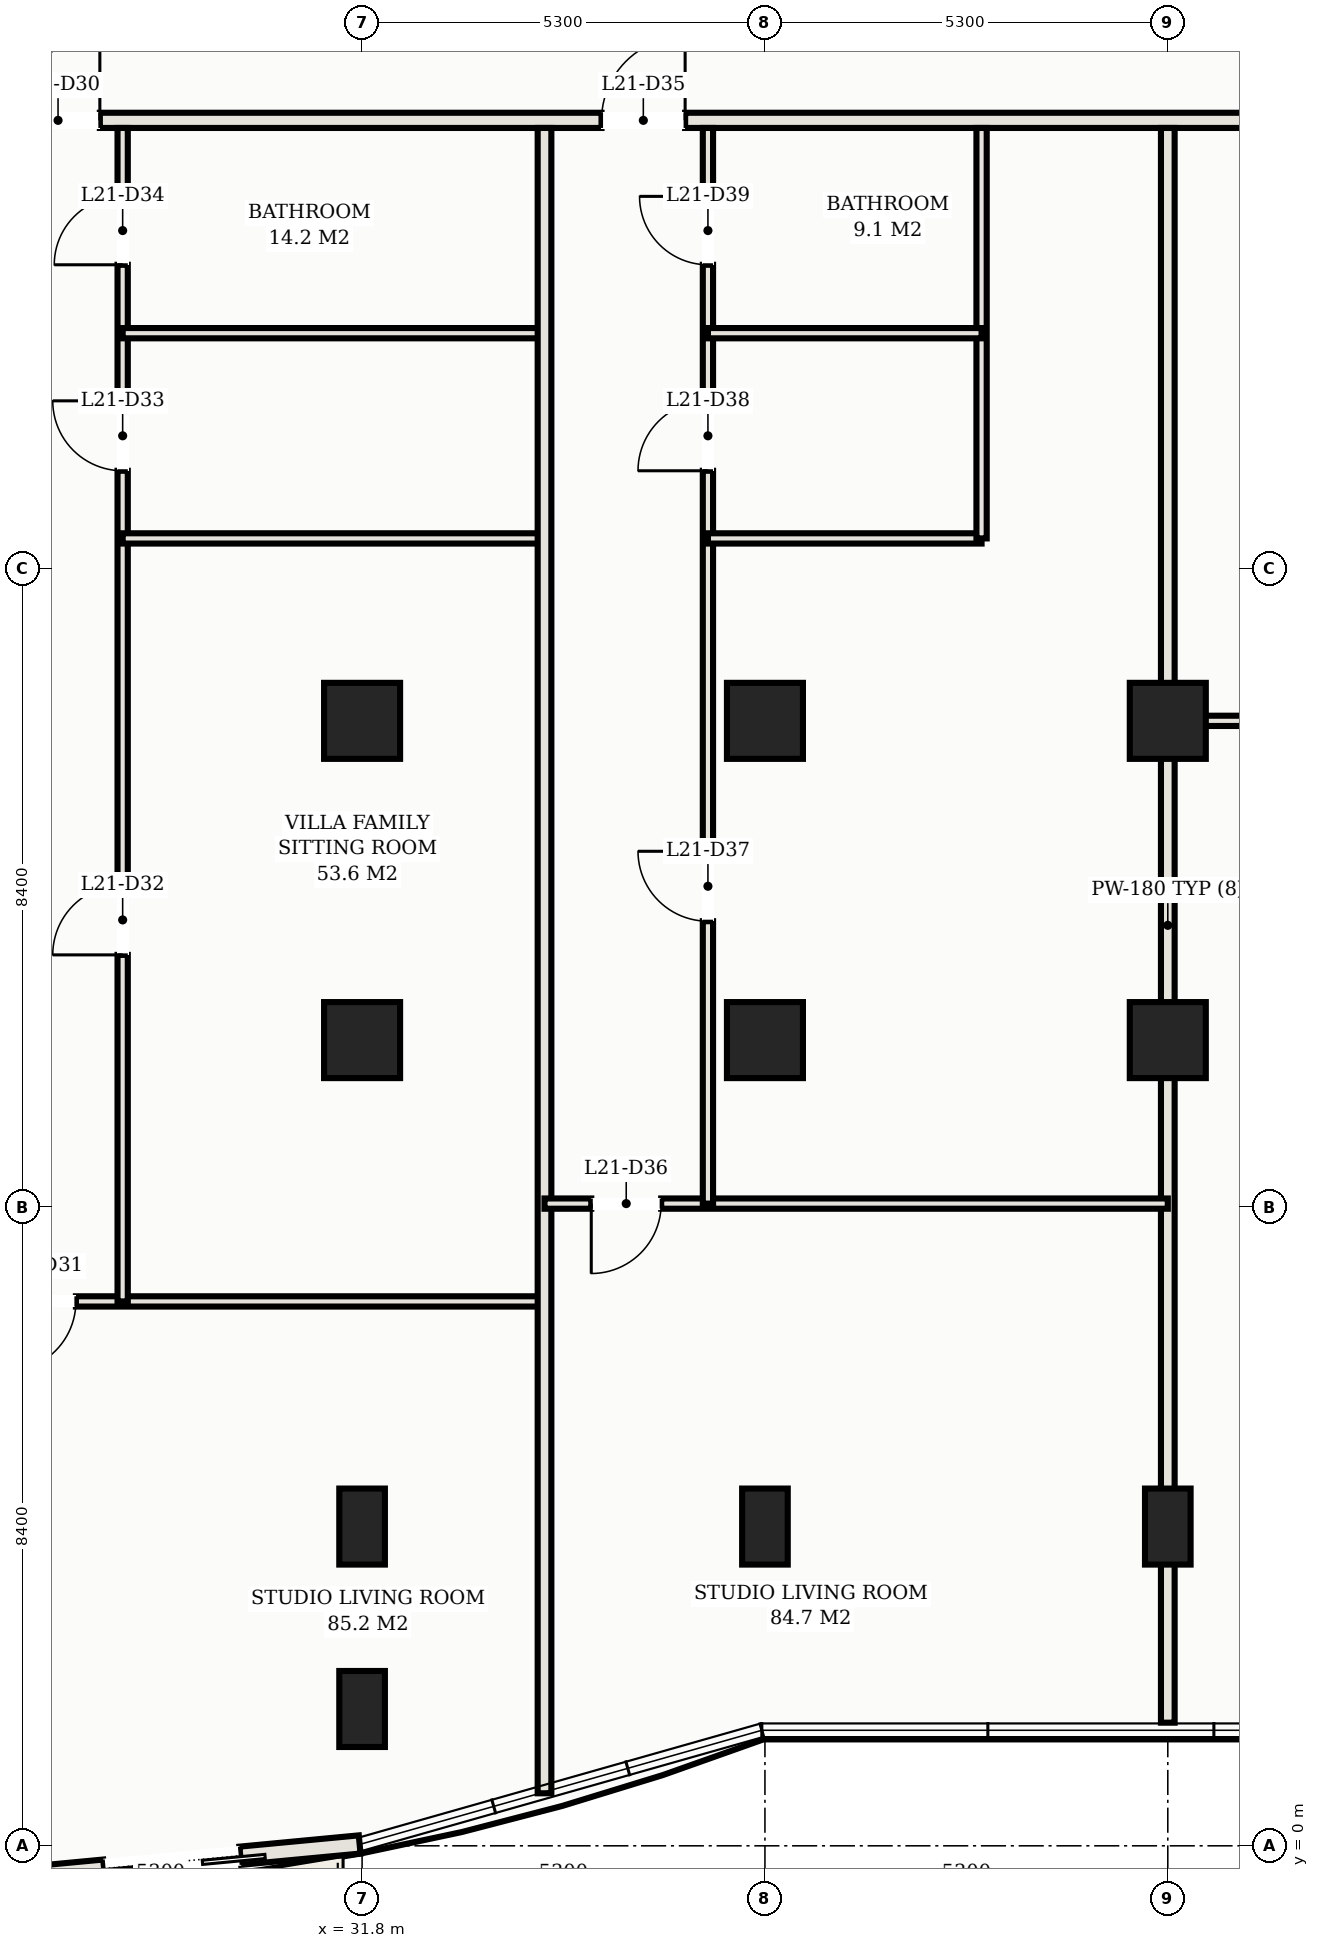
"""IFC4 building model, lengths in metres.
Left out: names, types, materials, properties, quantities, classifications, styles, units other than length and angle.
Written with IfcOpenShell. Run it as: python <this file> out.ifc"""

import sys

from ifc_helpers import new_model, si_unit, direction, frame, frame_2d, origin, origin_2d, place, context, subcontext, project, spatial, rectangle, hollow_rectangle, extrude, element, fill, save


model = new_model("IFC4")
c1 = context("Model", 3, precision=1e-05, world=origin(), true_north=direction((0.0, 1.0)))
c2 = subcontext(c1, "Body", "Model", "MODEL_VIEW")
j1 = project(units=[si_unit("LENGTHUNIT", "METRE"), si_unit("PLANEANGLEUNIT", "RADIAN")], contexts=[c1])
p1 = place(None, origin())
s1 = spatial("IfcSite", under=j1, at=p1, CompositionType="ELEMENT")
p2 = place(p1, origin())
s2 = spatial("IfcBuilding", under=s1, at=p2, CompositionType="ELEMENT")
p3 = place(p2, frame((0.0, 0.0, 81.7)))
s3 = spatial("IfcBuildingStorey", under=s2, at=p3, CompositionType="ELEMENT", Elevation=81.7)
for number, where, z_axis, x_axis in (
    (1, (31.8, 14.8, 0.0), (0.0, 0.0, 1.0), (1.0, 0.0, 0.0)),
    (2, (31.8, 10.6, 0.0), (0.0, 0.0, 1.0), (1.0, 0.0, 0.0)),
    (3, (37.1, 14.8, 0.0), (0.0, 0.0, 1.0), (1.0, 0.0, 0.0)),
    (4, (37.1, 10.6, 0.0), (0.0, 0.0, 1.0), (1.0, 0.0, 0.0)),
    (5, (42.4, 14.8, 0.0), (0.0, 0.0, 1.0), (1.0, 0.0, 0.0)),
    (6, (42.4, 10.6, 0.0), (0.0, 0.0, 1.0), (1.0, 0.0, 0.0)),
):
    element("IfcColumn", number, at=place(p3, frame(where, z_axis=z_axis, x_axis=x_axis)), inside=s3, PredefinedType="COLUMN", context=c2, shape_type="SweptSolid", body=[
        extrude(hollow_rectangle(XDim=1.0, YDim=1.0, WallThickness=0.036, at=origin_2d()), origin(), (0.0, 0.0, 1.0), 3.3),
    ])
for number, where, z_axis, x_axis in (
    (7, (31.8, 1.8, 0.0), (0.0, 0.0, 1.0), (1.0, 0.0, 0.0)),
    (8, (31.8, 4.2, 0.0), (0.0, 0.0, 1.0), (1.0, 0.0, 0.0)),
    (9, (37.1, 4.2, 0.0), (0.0, 0.0, 1.0), (1.0, 0.0, 0.0)),
    (10, (42.4, 4.2, 0.0), (0.0, 0.0, 1.0), (1.0, 0.0, 0.0)),
):
    element("IfcColumn", number, at=place(p3, frame(where, z_axis=z_axis, x_axis=x_axis)), inside=s3, PredefinedType="COLUMN", context=c2, shape_type="SweptSolid", body=[
        extrude(hollow_rectangle(XDim=0.6, YDim=1.0, WallThickness=0.032, at=origin_2d()), origin(), (0.0, 0.0, 1.0), 3.3),
    ])
p4 = place(p3, frame((26.5, -0.48, 0.0), z_axis=(0.0, 0.0, 1.0), x_axis=(0.995560760834, 0.094121046997, 0.0)))
e11 = element("IfcWall", 11, at=p4, inside=s3, PredefinedType="SOLIDWALL", context=c2, shape_type="SweptSolid", body=[
    extrude(rectangle(XDim=5.292, YDim=0.24, at=frame_2d((2.646, 0.0))), origin(), (0.0, 0.0, 1.0), 3.09),
])
p5 = place(p4, frame((1.914, 0.0, 0.0)))
e12 = element("IfcOpeningElement", 12, at=p5, cuts=e11, PredefinedType="OPENING", context=c2, shape_type="SweptSolid", body=[
    extrude(rectangle(XDim=1.8, YDim=2.2, at=frame_2d((0.9, 1.1))), frame((0.0, 0.13, 0.0), z_axis=(0.0, -1.0, 0.0), x_axis=(1.0, 0.0, 0.0)), (0.0, 0.0, 1.0), 0.26),
])
p6 = place(p3, frame((1.62, 22.7, 0.0), z_axis=(0.0, 0.0, 1.0), x_axis=(1.0, 0.0, 0.0)))
e13 = element("IfcWall", 13, at=p6, inside=s3, PredefinedType="PARTITIONING", context=c2, shape_type="SweptSolid", body=[
    extrude(rectangle(XDim=49.76, YDim=0.2, at=frame_2d((24.88, 0.0))), origin(), (0.0, 0.0, 1.0), 2.38),
])
p7 = place(p6, frame((9.73, 0.0, 0.0)))
e14 = element("IfcOpeningElement", 14, at=p7, cuts=e13, PredefinedType="OPENING", context=c2, shape_type="SweptSolid", body=[
    extrude(rectangle(XDim=1.1, YDim=2.25, at=frame_2d((0.55, 1.125))), frame((0.0, 0.11, 0.0), z_axis=(0.0, -1.0, 0.0), x_axis=(1.0, 0.0, 0.0)), (0.0, 0.0, 1.0), 0.22),
])
p8 = place(p6, frame((15.03, 0.0, 0.0)))
e15 = element("IfcOpeningElement", 15, at=p8, cuts=e13, PredefinedType="OPENING", context=c2, shape_type="SweptSolid", body=[
    extrude(rectangle(XDim=1.1, YDim=2.25, at=frame_2d((0.55, 1.125))), frame((0.0, 0.11, 0.0), z_axis=(0.0, -1.0, 0.0), x_axis=(1.0, 0.0, 0.0)), (0.0, 0.0, 1.0), 0.22),
])
p9 = place(p6, frame((20.33, 0.0, 0.0)))
e16 = element("IfcOpeningElement", 16, at=p9, cuts=e13, PredefinedType="OPENING", context=c2, shape_type="SweptSolid", body=[
    extrude(rectangle(XDim=1.1, YDim=2.25, at=frame_2d((0.55, 1.125))), frame((0.0, 0.11, 0.0), z_axis=(0.0, -1.0, 0.0), x_axis=(1.0, 0.0, 0.0)), (0.0, 0.0, 1.0), 0.22),
])
p10 = place(p6, frame((25.63, 0.0, 0.0)))
e17 = element("IfcOpeningElement", 17, at=p10, cuts=e13, PredefinedType="OPENING", context=c2, shape_type="SweptSolid", body=[
    extrude(rectangle(XDim=1.1, YDim=2.25, at=frame_2d((0.55, 1.125))), frame((0.0, 0.11, 0.0), z_axis=(0.0, -1.0, 0.0), x_axis=(1.0, 0.0, 0.0)), (0.0, 0.0, 1.0), 0.22),
])
p11 = place(p6, frame((33.33, 0.0, 0.0)))
e18 = element("IfcOpeningElement", 18, at=p11, cuts=e13, PredefinedType="OPENING", context=c2, shape_type="SweptSolid", body=[
    extrude(rectangle(XDim=1.1, YDim=2.25, at=frame_2d((0.55, 1.125))), frame((0.0, 0.11, 0.0), z_axis=(0.0, -1.0, 0.0), x_axis=(1.0, 0.0, 0.0)), (0.0, 0.0, 1.0), 0.22),
])
p12 = place(p6, frame((3.985, 0.0, 0.0)))
e19 = element("IfcOpeningElement", 19, at=p12, cuts=e13, PredefinedType="OPENING", context=c2, shape_type="SweptSolid", body=[
    extrude(rectangle(XDim=0.92, YDim=2.15, at=frame_2d((0.46, 1.075))), frame((0.0, 0.11, 0.0), z_axis=(0.0, -1.0, 0.0), x_axis=(1.0, 0.0, 0.0)), (0.0, 0.0, 1.0), 0.22),
])
p13 = place(p6, frame((44.855, 0.0, 0.0)))
e20 = element("IfcOpeningElement", 20, at=p13, cuts=e13, PredefinedType="OPENING", context=c2, shape_type="SweptSolid", body=[
    extrude(rectangle(XDim=0.92, YDim=2.15, at=frame_2d((0.46, 1.075))), frame((0.0, 0.11, 0.0), z_axis=(0.0, -1.0, 0.0), x_axis=(1.0, 0.0, 0.0)), (0.0, 0.0, 1.0), 0.22),
])
p14 = place(p3, frame((42.4, 1.62, 0.0), z_axis=(0.0, 0.0, 1.0), x_axis=(0.0, 1.0, 0.0)))
e21 = element("IfcWall", 21, at=p14, inside=s3, PredefinedType="PARTITIONING", context=c2, shape_type="SweptSolid", body=[
    extrude(rectangle(XDim=20.98, YDim=0.18, at=frame_2d((10.49, 0.0))), origin(), (0.0, 0.0, 1.0), 2.335),
])
p15 = place(p3, frame((26.5, 7.162, 0.0), z_axis=(0.0, 0.0, 1.0), x_axis=(1.0, 0.0, 0.0)))
e22 = element("IfcWall", 22, at=p15, inside=s3, PredefinedType="PARTITIONING", context=c2, shape_type="SweptSolid", body=[
    extrude(rectangle(XDim=7.7, YDim=0.135, at=frame_2d((3.85, 0.0))), origin(), (0.0, 0.0, 1.0), 2.38),
])
p16 = place(p15, frame((0.615, 0.0, 0.0)))
e23 = element("IfcOpeningElement", 23, at=p16, cuts=e22, PredefinedType="OPENING", context=c2, shape_type="SweptSolid", body=[
    extrude(rectangle(XDim=0.92, YDim=2.15, at=frame_2d((0.46, 1.075))), frame((0.0, 0.078, 0.0), z_axis=(0.0, -1.0, 0.0), x_axis=(1.0, 0.0, 0.0)), (0.0, 0.0, 1.0), 0.155),
])
p17 = place(p3, frame((28.65, 7.162, 0.0), z_axis=(0.0, 0.0, 1.0), x_axis=(0.0, 1.0, 0.0)))
e24 = element("IfcWall", 24, at=p17, inside=s3, PredefinedType="PARTITIONING", context=c2, shape_type="SweptSolid", body=[
    extrude(rectangle(XDim=15.438, YDim=0.135, at=frame_2d((7.719, 0.0))), origin(), (0.0, 0.0, 1.0), 2.38),
])
p18 = place(p17, frame((4.559, 0.0, 0.0)))
e25 = element("IfcOpeningElement", 25, at=p18, cuts=e24, PredefinedType="OPENING", context=c2, shape_type="SweptSolid", body=[
    extrude(rectangle(XDim=0.92, YDim=2.15, at=frame_2d((0.46, 1.075))), frame((0.0, 0.078, 0.0), z_axis=(0.0, -1.0, 0.0), x_axis=(1.0, 0.0, 0.0)), (0.0, 0.0, 1.0), 0.155),
])
p19 = place(p17, frame((10.928, 0.0, 0.0)))
e26 = element("IfcOpeningElement", 26, at=p19, cuts=e24, PredefinedType="OPENING", context=c2, shape_type="SweptSolid", body=[
    extrude(rectangle(XDim=0.92, YDim=2.15, at=frame_2d((0.46, 1.075))), frame((0.0, 0.078, 0.0), z_axis=(0.0, -1.0, 0.0), x_axis=(1.0, 0.0, 0.0)), (0.0, 0.0, 1.0), 0.155),
])
p20 = place(p17, frame((13.638, 0.0, 0.0)))
e27 = element("IfcOpeningElement", 27, at=p20, cuts=e24, PredefinedType="OPENING", context=c2, shape_type="SweptSolid", body=[
    extrude(rectangle(XDim=0.9, YDim=2.15, at=frame_2d((0.45, 1.075))), frame((0.0, 0.078, 0.0), z_axis=(0.0, -1.0, 0.0), x_axis=(1.0, 0.0, 0.0)), (0.0, 0.0, 1.0), 0.155),
])
for number, where, z_axis, x_axis in (
    (28, (28.65, 17.2, 0.0), (0.0, 0.0, 1.0), (1.0, 0.0, 0.0)),
    (29, (28.65, 19.9, 0.0), (0.0, 0.0, 1.0), (1.0, 0.0, 0.0)),
):
    element("IfcWall", number, at=place(p3, frame(where, z_axis=z_axis, x_axis=x_axis)), inside=s3, PredefinedType="PARTITIONING", context=c2, shape_type="SweptSolid", body=[
        extrude(rectangle(XDim=5.55, YDim=0.135, at=frame_2d((2.775, 0.0))), origin(), (0.0, 0.0, 1.0), 2.38),
    ])
p21 = place(p3, frame((34.2, 0.691, 0.0), z_axis=(0.0, 0.0, 1.0), x_axis=(0.0, 1.0, 0.0)))
e30 = element("IfcWall", 30, at=p21, inside=s3, PredefinedType="PARTITIONING", context=c2, shape_type="SweptSolid", body=[
    extrude(rectangle(XDim=21.909, YDim=0.18, at=frame_2d((10.955, 0.0))), origin(), (0.0, 0.0, 1.0), 2.38),
])
p22 = place(p3, frame((34.2, 8.449, 0.0), z_axis=(0.0, 0.0, 1.0), x_axis=(1.0, 0.0, 0.0)))
e31 = element("IfcWall", 31, at=p22, inside=s3, PredefinedType="PARTITIONING", context=c2, shape_type="SweptSolid", body=[
    extrude(rectangle(XDim=8.2, YDim=0.135, at=frame_2d((4.1, 0.0))), origin(), (0.0, 0.0, 1.0), 2.38),
])
p23 = place(p22, frame((0.615, 0.0, 0.0)))
e32 = element("IfcOpeningElement", 32, at=p23, cuts=e31, PredefinedType="OPENING", context=c2, shape_type="SweptSolid", body=[
    extrude(rectangle(XDim=0.92, YDim=2.15, at=frame_2d((0.46, 1.075))), frame((0.0, 0.078, 0.0), z_axis=(0.0, -1.0, 0.0), x_axis=(1.0, 0.0, 0.0)), (0.0, 0.0, 1.0), 0.155),
])
p24 = place(p3, frame((36.35, 8.449, 0.0), z_axis=(0.0, 0.0, 1.0), x_axis=(0.0, 1.0, 0.0)))
e33 = element("IfcWall", 33, at=p24, inside=s3, PredefinedType="PARTITIONING", context=c2, shape_type="SweptSolid", body=[
    extrude(rectangle(XDim=14.151, YDim=0.135, at=frame_2d((7.076, 0.0))), origin(), (0.0, 0.0, 1.0), 2.38),
])
p25 = place(p24, frame((3.715, 0.0, 0.0)))
e34 = element("IfcOpeningElement", 34, at=p25, cuts=e33, PredefinedType="OPENING", context=c2, shape_type="SweptSolid", body=[
    extrude(rectangle(XDim=0.92, YDim=2.15, at=frame_2d((0.46, 1.075))), frame((0.0, 0.078, 0.0), z_axis=(0.0, -1.0, 0.0), x_axis=(1.0, 0.0, 0.0)), (0.0, 0.0, 1.0), 0.155),
])
p26 = place(p24, frame((9.641, 0.0, 0.0)))
e35 = element("IfcOpeningElement", 35, at=p26, cuts=e33, PredefinedType="OPENING", context=c2, shape_type="SweptSolid", body=[
    extrude(rectangle(XDim=0.92, YDim=2.15, at=frame_2d((0.46, 1.075))), frame((0.0, 0.078, 0.0), z_axis=(0.0, -1.0, 0.0), x_axis=(1.0, 0.0, 0.0)), (0.0, 0.0, 1.0), 0.155),
])
p27 = place(p24, frame((12.351, 0.0, 0.0)))
e36 = element("IfcOpeningElement", 36, at=p27, cuts=e33, PredefinedType="OPENING", context=c2, shape_type="SweptSolid", body=[
    extrude(rectangle(XDim=0.9, YDim=2.15, at=frame_2d((0.45, 1.075))), frame((0.0, 0.078, 0.0), z_axis=(0.0, -1.0, 0.0), x_axis=(1.0, 0.0, 0.0)), (0.0, 0.0, 1.0), 0.155),
])
p28 = place(p3, frame((36.35, 17.2, 0.0), z_axis=(0.0, 0.0, 1.0), x_axis=(1.0, 0.0, 0.0)))
e37 = element("IfcWall", 37, at=p28, inside=s3, PredefinedType="PARTITIONING", context=c2, shape_type="SweptSolid", body=[
    extrude(rectangle(XDim=3.6, YDim=0.135, at=frame_2d((1.8, 0.0))), origin(), (0.0, 0.0, 1.0), 2.38),
])
p29 = place(p3, frame((39.95, 17.2, 0.0), z_axis=(0.0, 0.0, 1.0), x_axis=(0.0, 1.0, 0.0)))
e38 = element("IfcWall", 38, at=p29, inside=s3, PredefinedType="PARTITIONING", context=c2, shape_type="SweptSolid", body=[
    extrude(rectangle(XDim=5.4, YDim=0.135, at=frame_2d((2.7, 0.0))), origin(), (0.0, 0.0, 1.0), 2.38),
])
p30 = place(p3, frame((36.35, 19.9, 0.0), z_axis=(0.0, 0.0, 1.0), x_axis=(1.0, 0.0, 0.0)))
e39 = element("IfcWall", 39, at=p30, inside=s3, PredefinedType="PARTITIONING", context=c2, shape_type="SweptSolid", body=[
    extrude(rectangle(XDim=3.6, YDim=0.135, at=frame_2d((1.8, 0.0))), origin(), (0.0, 0.0, 1.0), 2.38),
])
p31 = place(p3, frame((42.4, 14.8, 0.0), z_axis=(0.0, 0.0, 1.0), x_axis=(1.0, 0.0, 0.0)))
e40 = element("IfcWall", 40, at=p31, inside=s3, PredefinedType="PARTITIONING", context=c2, shape_type="SweptSolid", body=[
    extrude(rectangle(XDim=8.88, YDim=0.135, at=frame_2d((4.44, 0.0))), origin(), (0.0, 0.0, 1.0), 2.335),
])
p32 = place(p31, frame((2.28, 0.0, 0.0)))
e41 = element("IfcOpeningElement", 41, at=p32, cuts=e40, PredefinedType="OPENING", context=c2, shape_type="SweptSolid", body=[
    extrude(rectangle(XDim=0.92, YDim=2.15, at=frame_2d((0.46, 1.075))), frame((0.0, 0.078, 0.0), z_axis=(0.0, -1.0, 0.0), x_axis=(1.0, 0.0, 0.0)), (0.0, 0.0, 1.0), 0.155),
])
p33 = place(p5, frame((1.8, 0.0, 0.0), z_axis=(0.0, 0.0, 1.0), x_axis=(-1.0, 0.0, 0.0)))
e42 = element("IfcDoor", 42, at=p33, inside=s3, OperationType="DOUBLE_DOOR_SLIDING", PredefinedType="DOOR", context=c2, shape_type="SweptSolid", body=[
    extrude(rectangle(XDim=1.8, YDim=2.2, at=frame_2d((0.9, 1.1))), frame((0.0, 0.025, 0.0), z_axis=(0.0, -1.0, 0.0), x_axis=(1.0, 0.0, 0.0)), (0.0, 0.0, 1.0), 0.05),
])
fill(e12, e42)
p34 = place(p10, origin())
e43 = element("IfcDoor", 43, at=p34, inside=s3, OperationType="SINGLE_SWING_RIGHT", PredefinedType="DOOR", context=c2, shape_type="SweptSolid", body=[
    extrude(rectangle(XDim=1.1, YDim=2.25, at=frame_2d((0.55, 1.125))), frame((0.0, 0.025, 0.0), z_axis=(0.0, -1.0, 0.0), x_axis=(1.0, 0.0, 0.0)), (0.0, 0.0, 1.0), 0.05),
])
fill(e17, e43)
p35 = place(p16, frame((0.92, 0.0, 0.0), z_axis=(0.0, 0.0, 1.0), x_axis=(-1.0, 0.0, 0.0)))
e44 = element("IfcDoor", 44, at=p35, inside=s3, OperationType="SINGLE_SWING_RIGHT", PredefinedType="DOOR", context=c2, shape_type="SweptSolid", body=[
    extrude(rectangle(XDim=0.92, YDim=2.15, at=frame_2d((0.46, 1.075))), frame((0.0, 0.025, 0.0), z_axis=(0.0, -1.0, 0.0), x_axis=(1.0, 0.0, 0.0)), (0.0, 0.0, 1.0), 0.05),
])
fill(e23, e44)
p36 = place(p18, origin())
e45 = element("IfcDoor", 45, at=p36, inside=s3, OperationType="SINGLE_SWING_LEFT", PredefinedType="DOOR", context=c2, shape_type="SweptSolid", body=[
    extrude(rectangle(XDim=0.92, YDim=2.15, at=frame_2d((0.46, 1.075))), frame((0.0, 0.025, 0.0), z_axis=(0.0, -1.0, 0.0), x_axis=(1.0, 0.0, 0.0)), (0.0, 0.0, 1.0), 0.05),
])
fill(e25, e45)
p37 = place(p19, origin())
e46 = element("IfcDoor", 46, at=p37, inside=s3, OperationType="SINGLE_SWING_RIGHT", PredefinedType="DOOR", context=c2, shape_type="SweptSolid", body=[
    extrude(rectangle(XDim=0.92, YDim=2.15, at=frame_2d((0.46, 1.075))), frame((0.0, 0.025, 0.0), z_axis=(0.0, -1.0, 0.0), x_axis=(1.0, 0.0, 0.0)), (0.0, 0.0, 1.0), 0.05),
])
fill(e26, e46)
p38 = place(p20, origin())
e47 = element("IfcDoor", 47, at=p38, inside=s3, OperationType="SINGLE_SWING_LEFT", PredefinedType="DOOR", context=c2, shape_type="SweptSolid", body=[
    extrude(rectangle(XDim=0.9, YDim=2.15, at=frame_2d((0.45, 1.075))), frame((0.0, 0.025, 0.0), z_axis=(0.0, -1.0, 0.0), x_axis=(1.0, 0.0, 0.0)), (0.0, 0.0, 1.0), 0.05),
])
fill(e27, e47)
p39 = place(p11, origin())
e48 = element("IfcDoor", 48, at=p39, inside=s3, OperationType="SINGLE_SWING_RIGHT", PredefinedType="DOOR", context=c2, shape_type="SweptSolid", body=[
    extrude(rectangle(XDim=1.1, YDim=2.25, at=frame_2d((0.55, 1.125))), frame((0.0, 0.025, 0.0), z_axis=(0.0, -1.0, 0.0), x_axis=(1.0, 0.0, 0.0)), (0.0, 0.0, 1.0), 0.05),
])
fill(e18, e48)
p40 = place(p23, frame((0.92, 0.0, 0.0), z_axis=(0.0, 0.0, 1.0), x_axis=(-1.0, 0.0, 0.0)))
e49 = element("IfcDoor", 49, at=p40, inside=s3, OperationType="SINGLE_SWING_RIGHT", PredefinedType="DOOR", context=c2, shape_type="SweptSolid", body=[
    extrude(rectangle(XDim=0.92, YDim=2.15, at=frame_2d((0.46, 1.075))), frame((0.0, 0.025, 0.0), z_axis=(0.0, -1.0, 0.0), x_axis=(1.0, 0.0, 0.0)), (0.0, 0.0, 1.0), 0.05),
])
fill(e32, e49)
p41 = place(p25, origin())
e50 = element("IfcDoor", 50, at=p41, inside=s3, OperationType="SINGLE_SWING_RIGHT", PredefinedType="DOOR", context=c2, shape_type="SweptSolid", body=[
    extrude(rectangle(XDim=0.92, YDim=2.15, at=frame_2d((0.46, 1.075))), frame((0.0, 0.025, 0.0), z_axis=(0.0, -1.0, 0.0), x_axis=(1.0, 0.0, 0.0)), (0.0, 0.0, 1.0), 0.05),
])
fill(e34, e50)
p42 = place(p26, origin())
e51 = element("IfcDoor", 51, at=p42, inside=s3, OperationType="SINGLE_SWING_LEFT", PredefinedType="DOOR", context=c2, shape_type="SweptSolid", body=[
    extrude(rectangle(XDim=0.92, YDim=2.15, at=frame_2d((0.46, 1.075))), frame((0.0, 0.025, 0.0), z_axis=(0.0, -1.0, 0.0), x_axis=(1.0, 0.0, 0.0)), (0.0, 0.0, 1.0), 0.05),
])
fill(e35, e51)
p43 = place(p27, origin())
e52 = element("IfcDoor", 52, at=p43, inside=s3, OperationType="SINGLE_SWING_RIGHT", PredefinedType="DOOR", context=c2, shape_type="SweptSolid", body=[
    extrude(rectangle(XDim=0.9, YDim=2.15, at=frame_2d((0.45, 1.075))), frame((0.0, 0.025, 0.0), z_axis=(0.0, -1.0, 0.0), x_axis=(1.0, 0.0, 0.0)), (0.0, 0.0, 1.0), 0.05),
])
fill(e36, e52)
save(model, sys.argv[1])
